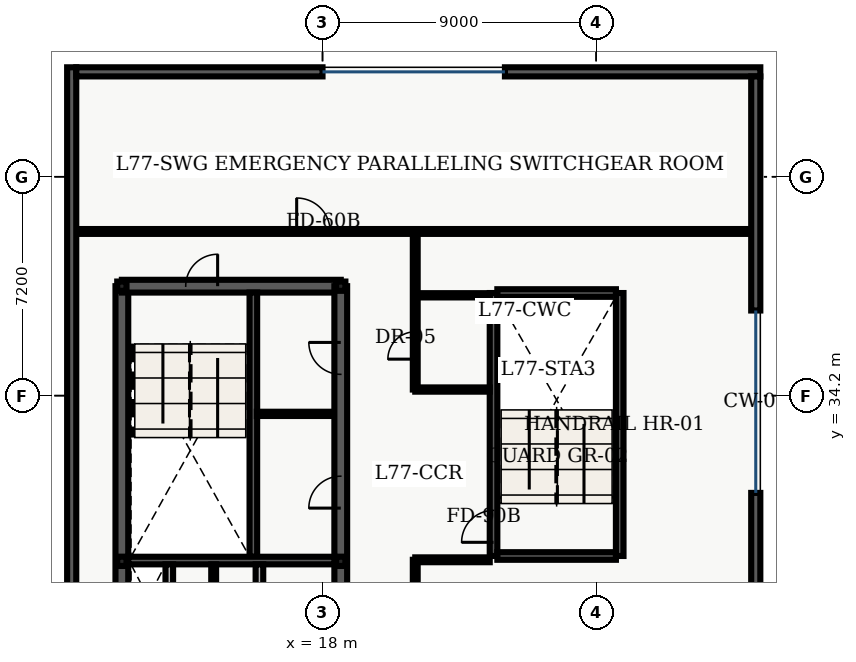
"""IFC4 building model, lengths in metres.
Left out: names, types, materials, properties, quantities, classifications, styles, units other than length and angle.
Written with IfcOpenShell. Run it as: python <this file> out.ifc"""

import sys

from ifc_helpers import new_model, entity, si_unit, converted_unit, direction, frame, origin_with_axes, origin_2d_with_axis, place, context, subcontext, project, spatial, polyline, rectangle, hollow_rectangle, outline, extrude, element, fill, save


model = new_model("IFC4")
c1 = context("Model", 3, precision=1e-05, world=origin_with_axes(), true_north=direction((0.0, 1.0)))
c2 = subcontext(c1, "Body", "Model", "MODEL_VIEW")
j1 = project(units=[si_unit("LENGTHUNIT", "METRE"), converted_unit("PLANEANGLEUNIT", "DEGREE", entity("IfcPlaneAngleMeasure", 0.017), si_unit("PLANEANGLEUNIT", "RADIAN"), dimensions=[0, 0, 0, 0, 0, 0, 0])], contexts=[c1])
p1 = place(None, origin_with_axes())
s1 = spatial("IfcSite", under=j1, at=p1, CompositionType="ELEMENT")
p2 = place(p1, origin_with_axes())
s2 = spatial("IfcBuilding", under=s1, at=p2, CompositionType="ELEMENT")
p3 = place(p2, frame((0.0, 0.0, 312.6), z_axis=(0.0, 0.0, 1.0), x_axis=(1.0, 0.0, 0.0)))
s3 = spatial("IfcBuildingStorey", under=s2, at=p3, CompositionType="ELEMENT", Elevation=312.6)
p4 = place(p3, frame((11.4, 10.8, 0.0), z_axis=(0.0, 0.0, 1.0), x_axis=(0.0, 1.0, 0.0)))
e1 = element("IfcWall", 1, at=p4, inside=s3, PredefinedType="SHEAR", context=c2, shape_type="SweptSolid", body=[
    extrude(outline(polyline([(0.0, -0.21), (27.0, -0.21), (27.0, 0.21), (0.0, 0.21), (0.0, -0.21)])), origin_with_axes(), (0.0, 0.0, 1.0), 3.64),
])
p5 = place(p3, frame((11.4, 37.8, 0.0), z_axis=(0.0, 0.0, 1.0), x_axis=(1.0, 0.0, 0.0)))
e2 = element("IfcWall", 2, at=p5, inside=s3, PredefinedType="SHEAR", context=c2, shape_type="SweptSolid", body=[
    extrude(outline(polyline([(0.0, -0.21), (7.2, -0.21), (7.2, 0.21), (0.0, 0.21), (0.0, -0.21)])), origin_with_axes(), (0.0, 0.0, 1.0), 3.64),
])
p6 = place(p5, frame((2.625, 0.0, 0.0), z_axis=(0.0, 0.0, 1.0), x_axis=(1.0, 0.0, 0.0)))
e3 = element("IfcOpeningElement", 3, at=p6, cuts=e2, PredefinedType="OPENING", context=c2, shape_type="SweptSolid", body=[
    extrude(rectangle(XDim=1.05, YDim=0.44, at=origin_2d_with_axis()), origin_with_axes(), (0.0, 0.0, 1.0), 2.15),
])
p7 = place(p3, frame((18.6, 24.3, 0.0), z_axis=(0.0, 0.0, 1.0), x_axis=(0.0, 1.0, 0.0)))
e4 = element("IfcWall", 4, at=p7, inside=s3, PredefinedType="SHEAR", context=c2, shape_type="SweptSolid", body=[
    extrude(outline(polyline([(0.0, -0.21), (13.5, -0.21), (13.5, 0.21), (0.0, 0.21), (0.0, -0.21)])), origin_with_axes(), (0.0, 0.0, 1.0), 3.64),
])
p8 = place(p7, frame((3.2, 0.0, 0.0), z_axis=(0.0, 0.0, 1.0), x_axis=(1.0, 0.0, 0.0)))
e5 = element("IfcOpeningElement", 5, at=p8, cuts=e4, PredefinedType="OPENING", context=c2, shape_type="SweptSolid", body=[
    extrude(rectangle(XDim=0.9, YDim=0.44, at=origin_2d_with_axis()), origin_with_axes(), (0.0, 0.0, 1.0), 2.15),
])
p9 = place(p7, frame((6.725, 0.0, 0.0), z_axis=(0.0, 0.0, 1.0), x_axis=(1.0, 0.0, 0.0)))
e6 = element("IfcOpeningElement", 6, at=p9, cuts=e4, PredefinedType="OPENING", context=c2, shape_type="SweptSolid", body=[
    extrude(rectangle(XDim=1.05, YDim=0.44, at=origin_2d_with_axis()), origin_with_axes(), (0.0, 0.0, 1.0), 2.15),
])
p10 = place(p7, frame((11.125, 0.0, 0.0), z_axis=(0.0, 0.0, 1.0), x_axis=(1.0, 0.0, 0.0)))
e7 = element("IfcOpeningElement", 7, at=p10, cuts=e4, PredefinedType="OPENING", context=c2, shape_type="SweptSolid", body=[
    extrude(rectangle(XDim=1.05, YDim=0.44, at=origin_2d_with_axis()), origin_with_axes(), (0.0, 0.0, 1.0), 2.15),
])
p11 = place(p3, frame((15.725, 28.9, 0.0), z_axis=(0.0, 0.0, 1.0), x_axis=(0.0, 1.0, 0.0)))
e8 = element("IfcWall", 8, at=p11, inside=s3, PredefinedType="SHEAR", context=c2, shape_type="SweptSolid", body=[
    extrude(outline(polyline([(0.0, -0.125), (8.69, -0.125), (8.69, 0.125), (0.0, 0.125), (0.0, -0.125)])), origin_with_axes(), (0.0, 0.0, 1.0), 3.64),
])
p12 = place(p3, frame((11.61, 28.775, 0.0), z_axis=(0.0, 0.0, 1.0), x_axis=(1.0, 0.0, 0.0)))
e9 = element("IfcWall", 9, at=p12, inside=s3, PredefinedType="SHEAR", context=c2, shape_type="SweptSolid", body=[
    extrude(outline(polyline([(0.0, -0.125), (6.78, -0.125), (6.78, 0.125), (0.0, 0.125), (0.0, -0.125)])), origin_with_axes(), (0.0, 0.0, 1.0), 3.64),
])
for number, where, z_axis, x_axis in (
    (10, (12.96, 26.45, 0.0), (0.0, 0.0, 1.0), (0.0, 1.0, 0.0)),
    (11, (15.925, 26.45, 0.0), (0.0, 0.0, 1.0), (0.0, 1.0, 0.0)),
):
    element("IfcWall", number, at=place(p3, frame(where, z_axis=z_axis, x_axis=x_axis)), inside=s3, PredefinedType="SOLIDWALL", context=c2, shape_type="SweptSolid", body=[
        extrude(outline(polyline([(0.0, -0.125), (2.2, -0.125), (2.2, 0.125), (0.0, 0.125), (0.0, -0.125)])), origin_with_axes(), (0.0, 0.0, 1.0), 2.68),
    ])
p13 = place(p3, frame((23.625, 28.925, 0.0), z_axis=(0.0, 0.0, 1.0), x_axis=(0.0, 1.0, 0.0)))
e12 = element("IfcWall", 12, at=p13, inside=s3, PredefinedType="SHEAR", context=c2, shape_type="SweptSolid", body=[
    extrude(outline(polyline([(0.0, -0.125), (8.65, -0.125), (8.65, 0.125), (0.0, 0.125), (0.0, -0.125)])), origin_with_axes(), (0.0, 0.0, 1.0), 3.64),
])
p14 = place(p13, frame((0.975, 0.0, 0.0), z_axis=(0.0, 0.0, 1.0), x_axis=(1.0, 0.0, 0.0)))
e13 = element("IfcOpeningElement", 13, at=p14, cuts=e12, PredefinedType="OPENING", context=c2, shape_type="SweptSolid", body=[
    extrude(rectangle(XDim=1.05, YDim=0.27, at=origin_2d_with_axis()), origin_with_axes(), (0.0, 0.0, 1.0), 2.15),
])
p15 = place(p3, frame((27.775, 28.925, 0.0), z_axis=(0.0, 0.0, 1.0), x_axis=(0.0, 1.0, 0.0)))
e14 = element("IfcWall", 14, at=p15, inside=s3, PredefinedType="SHEAR", context=c2, shape_type="SweptSolid", body=[
    extrude(outline(polyline([(0.0, -0.125), (8.65, -0.125), (8.65, 0.125), (0.0, 0.125), (0.0, -0.125)])), origin_with_axes(), (0.0, 0.0, 1.0), 3.64),
])
for number, where, z_axis, x_axis in (
    (15, (23.75, 28.925, 0.0), (0.0, 0.0, 1.0), (1.0, 0.0, 0.0)),
    (16, (23.75, 37.575, 0.0), (0.0, 0.0, 1.0), (1.0, 0.0, 0.0)),
):
    element("IfcWall", number, at=place(p3, frame(where, z_axis=z_axis, x_axis=x_axis)), inside=s3, PredefinedType="SHEAR", context=c2, shape_type="SweptSolid", body=[
        extrude(outline(polyline([(0.0, -0.125), (3.9, -0.125), (3.9, 0.125), (0.0, 0.125), (0.0, -0.125)])), origin_with_axes(), (0.0, 0.0, 1.0), 3.64),
    ])
for number, where, z_axis, x_axis in (
    (17, (11.4, 28.75, 0.0), (0.0, 0.0, 1.0), (1.0, 0.0, 0.0)),
    (18, (11.4, 37.8, 0.0), (0.0, 0.0, 1.0), (1.0, 0.0, 0.0)),
    (19, (18.6, 28.75, 0.0), (0.0, 0.0, 1.0), (1.0, 0.0, 0.0)),
    (20, (18.6, 37.8, 0.0), (0.0, 0.0, 1.0), (1.0, 0.0, 0.0)),
):
    element("IfcColumn", number, at=place(p3, frame(where, z_axis=z_axis, x_axis=x_axis)), inside=s3, PredefinedType="COLUMN", context=c2, shape_type="SweptSolid", body=[
        extrude(hollow_rectangle(XDim=0.305, YDim=0.305, WallThickness=0.015, InnerFilletRadius=0.015, OuterFilletRadius=0.03, at=origin_2d_with_axis()), origin_with_axes(), (0.0, 0.0, 1.0), 3.9),
    ])
p16 = place(p3, frame((14.42, 26.45, 0.0), z_axis=(0.0, 0.0, 1.0), x_axis=(0.0, 1.0, 0.0)))
e21 = element("IfcWall", 21, at=p16, inside=s3, PredefinedType="PARTITIONING", context=c2, shape_type="SweptSolid", body=[
    extrude(outline(polyline([(0.0, -0.08), (2.2, -0.08), (2.2, 0.08), (0.0, 0.08), (0.0, -0.08)])), origin_with_axes(), (0.0, 0.0, 1.0), 2.68),
])
p17 = place(p16, frame((1.1, 0.0, 0.0), z_axis=(0.0, 0.0, 1.0), x_axis=(1.0, 0.0, 0.0)))
e22 = element("IfcOpeningElement", 22, at=p17, cuts=e21, PredefinedType="OPENING", context=c2, shape_type="SweptSolid", body=[
    extrude(rectangle(XDim=0.9, YDim=0.18, at=origin_2d_with_axis()), origin_with_axes(), (0.0, 0.0, 1.0), 2.15),
])
p18 = place(p3, frame((15.84, 33.6, 0.0), z_axis=(0.0, 0.0, 1.0), x_axis=(1.0, 0.0, 0.0)))
e23 = element("IfcWall", 23, at=p18, inside=s3, PredefinedType="PARTITIONING", context=c2, shape_type="SweptSolid", body=[
    extrude(outline(polyline([(0.0, -0.07), (2.46, -0.07), (2.46, 0.07), (0.0, 0.07), (0.0, -0.07)])), origin_with_axes(), (0.0, 0.0, 1.0), 2.68),
])
for number, where, z_axis, x_axis in (
    (24, (21.05, 34.4, 0.0), (0.0, 0.0, 1.0), (1.0, 0.0, 0.0)),
    (25, (21.05, 37.5, 0.0), (0.0, 0.0, 1.0), (1.0, 0.0, 0.0)),
):
    element("IfcWall", number, at=place(p3, frame(where, z_axis=z_axis, x_axis=x_axis)), inside=s3, PredefinedType="PARTITIONING", context=c2, shape_type="SweptSolid", body=[
        extrude(outline(polyline([(0.0, -0.07), (2.45, -0.07), (2.45, 0.07), (0.0, 0.07), (0.0, -0.07)])), origin_with_axes(), (0.0, 0.0, 1.0), 2.68),
    ])
p19 = place(p3, frame((21.05, 3.895, 0.0), z_axis=(0.0, 0.0, 1.0), x_axis=(0.0, 1.0, 0.0)))
e26 = element("IfcWall", 26, at=p19, inside=s3, PredefinedType="PARTITIONING", context=c2, shape_type="SweptSolid", body=[
    extrude(outline(polyline([(0.0, -0.08), (24.905, -0.08), (24.905, 0.08), (0.0, 0.08), (0.0, -0.08)])), origin_with_axes(), (0.0, 0.0, 1.0), 2.68),
])
p20 = place(p19, frame((4.78, 0.0, 0.0), z_axis=(0.0, 0.0, 1.0), x_axis=(1.0, 0.0, 0.0)))
e27 = element("IfcOpeningElement", 27, at=p20, cuts=e26, PredefinedType="OPENING", context=c2, shape_type="SweptSolid", body=[
    extrude(rectangle(XDim=1.05, YDim=0.18, at=origin_2d_with_axis()), origin_with_axes(), (0.0, 0.0, 1.0), 2.15),
])
p21 = place(p3, frame((21.05, 34.4, 0.0), z_axis=(0.0, 0.0, 1.0), x_axis=(0.0, 1.0, 0.0)))
e28 = element("IfcWall", 28, at=p21, inside=s3, PredefinedType="PARTITIONING", context=c2, shape_type="SweptSolid", body=[
    extrude(outline(polyline([(0.0, -0.08), (5.2, -0.08), (5.2, 0.08), (0.0, 0.08), (0.0, -0.08)])), origin_with_axes(), (0.0, 0.0, 1.0), 2.68),
])
p22 = place(p21, frame((1.45, 0.0, 0.0), z_axis=(0.0, 0.0, 1.0), x_axis=(1.0, 0.0, 0.0)))
e29 = element("IfcOpeningElement", 29, at=p22, cuts=e28, PredefinedType="OPENING", context=c2, shape_type="SweptSolid", body=[
    extrude(rectangle(XDim=0.9, YDim=0.18, at=origin_2d_with_axis()), origin_with_axes(), (0.0, 0.0, 1.0), 2.15),
])
p23 = place(p3, frame((21.05, 28.8, 0.0), z_axis=(0.0, 0.0, 1.0), x_axis=(1.0, 0.0, 0.0)))
e30 = element("IfcWall", 30, at=p23, inside=s3, PredefinedType="PARTITIONING", context=c2, shape_type="SweptSolid", body=[
    extrude(outline(polyline([(0.0, -0.08), (2.45, -0.08), (2.45, 0.08), (0.0, 0.08), (0.0, -0.08)])), origin_with_axes(), (0.0, 0.0, 1.0), 2.68),
])
p24 = place(p3, frame((9.895, 39.6, 0.0), z_axis=(0.0, 0.0, 1.0), x_axis=(1.0, 0.0, 0.0)))
e31 = element("IfcWall", 31, at=p24, inside=s3, PredefinedType="PARTITIONING", context=c2, shape_type="SweptSolid", body=[
    extrude(outline(polyline([(0.0, -0.08), (22.21, -0.08), (22.21, 0.08), (0.0, 0.08), (0.0, -0.08)])), origin_with_axes(), (0.0, 0.0, 1.0), 2.68),
])
p25 = place(p24, frame((7.805, 0.0, 0.0), z_axis=(0.0, 0.0, 1.0), x_axis=(1.0, 0.0, 0.0)))
e32 = element("IfcOpeningElement", 32, at=p25, cuts=e31, PredefinedType="OPENING", context=c2, shape_type="SweptSolid", body=[
    extrude(rectangle(XDim=1.1, YDim=0.18, at=origin_2d_with_axis()), origin_with_axes(), (0.0, 0.0, 1.0), 2.15),
])
p26 = place(p3, frame((9.75, 3.9, 0.0), z_axis=(0.0, 0.0, 1.0), x_axis=(0.0, 1.0, 0.0)))
e33 = element("IfcWall", 33, at=p26, inside=s3, PredefinedType="SOLIDWALL", context=c2, shape_type="SweptSolid", body=[
    extrude(outline(polyline([(0.0, -0.15), (41.1, -0.15), (41.1, 0.15), (0.0, 0.15), (0.0, -0.15)])), origin_with_axes(), (0.0, 0.0, 1.0), 3.64),
])
p27 = place(p3, frame((9.9, 44.85, 0.0), z_axis=(0.0, 0.0, 1.0), x_axis=(1.0, 0.0, 0.0)))
e34 = element("IfcWall", 34, at=p27, inside=s3, PredefinedType="SOLIDWALL", context=c2, shape_type="SweptSolid", body=[
    extrude(outline(polyline([(0.0, -0.15), (8.1, -0.15), (8.1, 0.15), (0.0, 0.15), (0.0, -0.15)])), origin_with_axes(), (0.0, 0.0, 1.0), 3.64),
])
p28 = place(p3, frame((24.0, 44.85, 0.0), z_axis=(0.0, 0.0, 1.0), x_axis=(1.0, 0.0, 0.0)))
e35 = element("IfcWall", 35, at=p28, inside=s3, PredefinedType="SOLIDWALL", context=c2, shape_type="SweptSolid", body=[
    extrude(outline(polyline([(0.0, -0.15), (8.4, -0.15), (8.4, 0.15), (0.0, 0.15), (0.0, -0.15)])), origin_with_axes(), (0.0, 0.0, 1.0), 3.64),
])
p29 = place(p3, frame((32.25, 44.7, 0.0), z_axis=(0.0, 0.0, 1.0), x_axis=(0.0, -1.0, 0.0)))
e36 = element("IfcWall", 36, at=p29, inside=s3, PredefinedType="SOLIDWALL", context=c2, shape_type="SweptSolid", body=[
    extrude(outline(polyline([(0.0, -0.15), (7.7, -0.15), (7.7, 0.15), (0.0, 0.15), (0.0, -0.15)])), origin_with_axes(), (0.0, 0.0, 1.0), 3.64),
])
p30 = place(p3, frame((32.25, 31.0, 0.0), z_axis=(0.0, 0.0, 1.0), x_axis=(0.0, -1.0, 0.0)))
e37 = element("IfcWall", 37, at=p30, inside=s3, PredefinedType="SOLIDWALL", context=c2, shape_type="SweptSolid", body=[
    extrude(outline(polyline([(0.0, -0.15), (27.4, -0.15), (27.4, 0.15), (0.0, 0.15), (0.0, -0.15)])), origin_with_axes(), (0.0, 0.0, 1.0), 3.64),
])
p31 = place(p5, frame((2.625, 0.0, 0.0), z_axis=(0.0, 0.0, 1.0), x_axis=(1.0, 0.0, 0.0)))
e38 = element("IfcDoor", 38, at=p31, inside=s3, OperationType="SINGLE_SWING_RIGHT", PredefinedType="DOOR", context=c2, shape_type="SweptSolid", body=[
    extrude(rectangle(XDim=1.05, YDim=0.09, at=origin_2d_with_axis()), origin_with_axes(), (0.0, 0.0, 1.0), 2.15),
])
fill(e3, e38)
p32 = place(p7, frame((6.725, 0.0, 0.0), z_axis=(0.0, 0.0, 1.0), x_axis=(1.0, 0.0, 0.0)))
e39 = element("IfcDoor", 39, at=p32, inside=s3, OperationType="SINGLE_SWING_LEFT", PredefinedType="DOOR", context=c2, shape_type="SweptSolid", body=[
    extrude(rectangle(XDim=1.05, YDim=0.09, at=origin_2d_with_axis()), origin_with_axes(), (0.0, 0.0, 1.0), 2.15),
])
fill(e6, e39)
p33 = place(p7, frame((11.125, 0.0, 0.0), z_axis=(0.0, 0.0, 1.0), x_axis=(1.0, 0.0, 0.0)))
e40 = element("IfcDoor", 40, at=p33, inside=s3, OperationType="SINGLE_SWING_RIGHT", PredefinedType="DOOR", context=c2, shape_type="SweptSolid", body=[
    extrude(rectangle(XDim=1.05, YDim=0.09, at=origin_2d_with_axis()), origin_with_axes(), (0.0, 0.0, 1.0), 2.15),
])
fill(e7, e40)
p34 = place(p13, frame((0.975, 0.0, 0.0), z_axis=(0.0, 0.0, 1.0), x_axis=(1.0, 0.0, 0.0)))
e41 = element("IfcDoor", 41, at=p34, inside=s3, OperationType="SINGLE_SWING_LEFT", PredefinedType="DOOR", context=c2, shape_type="SweptSolid", body=[
    extrude(rectangle(XDim=1.05, YDim=0.09, at=origin_2d_with_axis()), origin_with_axes(), (0.0, 0.0, 1.0), 2.15),
])
fill(e13, e41)
p35 = place(p21, frame((1.45, 0.0, 0.0), z_axis=(0.0, 0.0, 1.0), x_axis=(1.0, 0.0, 0.0)))
e42 = element("IfcDoor", 42, at=p35, inside=s3, OperationType="SINGLE_SWING_LEFT", PredefinedType="DOOR", context=c2, shape_type="SweptSolid", body=[
    extrude(rectangle(XDim=0.9, YDim=0.09, at=origin_2d_with_axis()), origin_with_axes(), (0.0, 0.0, 1.0), 2.15),
])
fill(e29, e42)
p36 = place(p24, frame((7.805, 0.0, 0.0), z_axis=(0.0, 0.0, 1.0), x_axis=(1.0, 0.0, 0.0)))
e43 = element("IfcDoor", 43, at=p36, inside=s3, OperationType="SINGLE_SWING_LEFT", PredefinedType="DOOR", context=c2, shape_type="SweptSolid", body=[
    extrude(rectangle(XDim=1.1, YDim=0.09, at=origin_2d_with_axis()), origin_with_axes(), (0.0, 0.0, 1.0), 2.15),
])
fill(e32, e43)
save(model, sys.argv[1])
